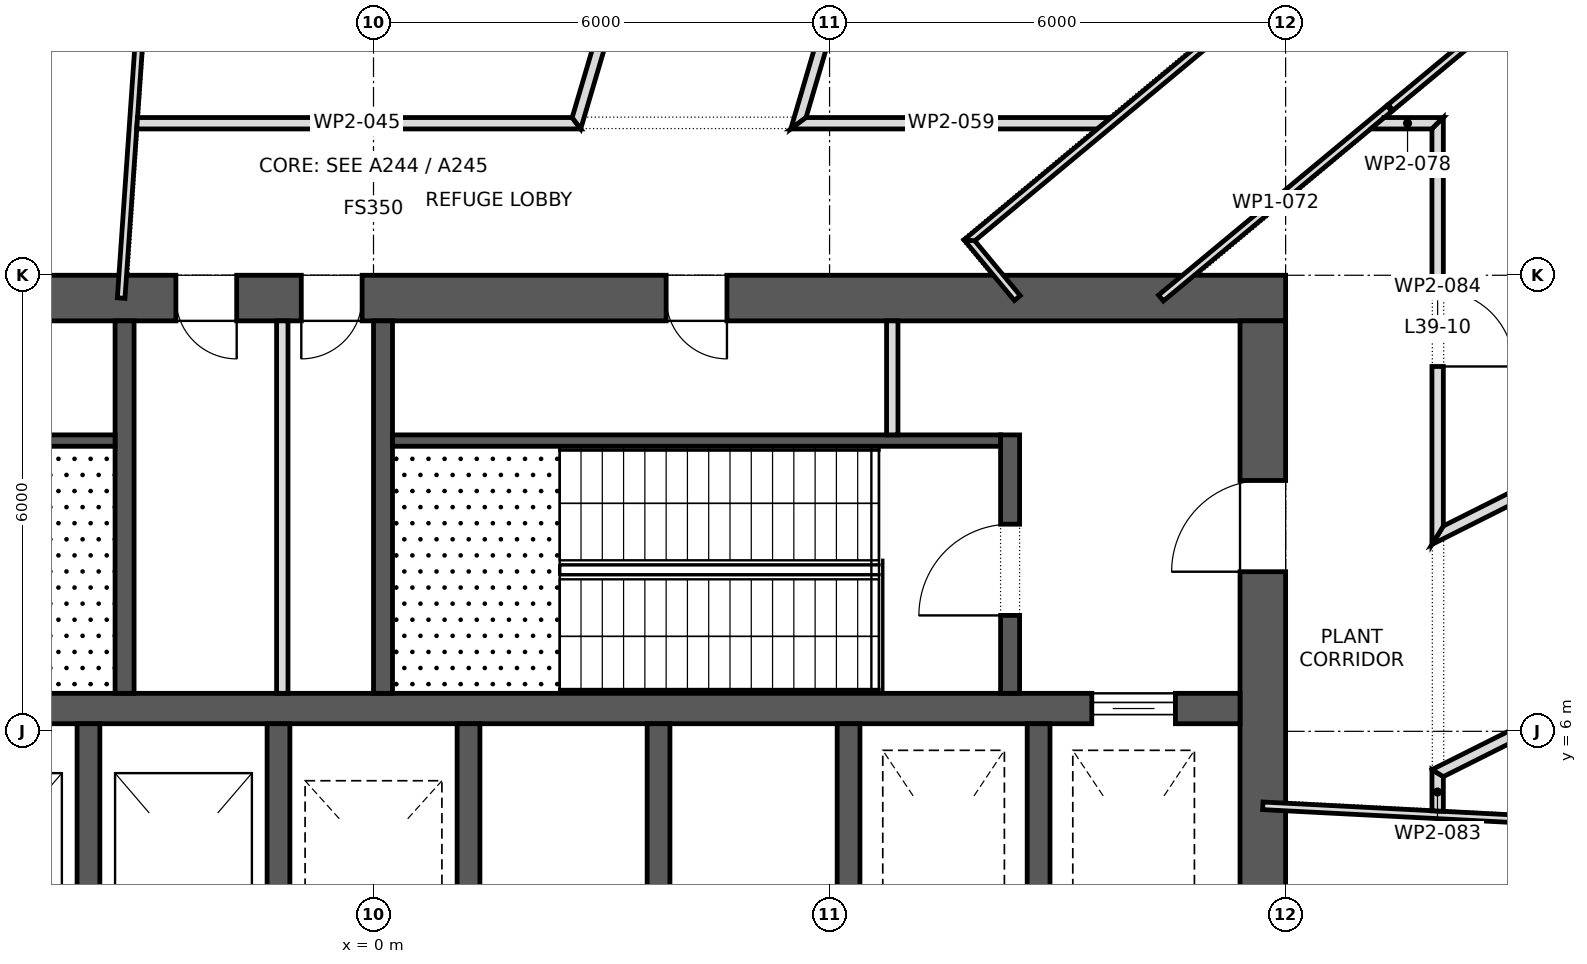
"""IFC4 building model, lengths in metres.
Left out: names, types, materials, properties, quantities, classifications, styles, units other than length and angle.
Written with IfcOpenShell. Run it as: python <this file> out.ifc"""

import sys

from ifc_helpers import new_model, si_unit, direction, frame, frame_2d, origin, place, context, subcontext, project, spatial, polyline, rectangle, outline, extrude, element, fill, save


model = new_model("IFC4")
c1 = context("Model", 3, precision=1e-05, world=origin(), true_north=direction((0.0, 1.0)))
c2 = subcontext(c1, "Body", "Model", "MODEL_VIEW")
j1 = project(units=[si_unit("LENGTHUNIT", "METRE"), si_unit("PLANEANGLEUNIT", "RADIAN")], contexts=[c1])
p1 = place(None, origin())
s1 = spatial("IfcSite", under=j1, at=p1, CompositionType="ELEMENT")
p2 = place(p1, origin())
s2 = spatial("IfcBuilding", under=s1, at=p2, CompositionType="ELEMENT")
p3 = place(p2, frame((0.0, 0.0, 173.5)))
s3 = spatial("IfcBuildingStorey", under=s2, at=p3, CompositionType="ELEMENT", Elevation=173.5)
p4 = place(p3, frame((-12.0, 11.7, 0.0), z_axis=(0.0, 0.0, 1.0), x_axis=(1.0, 0.0, 0.0)))
e1 = element("IfcWall", 1, at=p4, inside=s3, PredefinedType="SHEAR", context=c2, shape_type="SweptSolid", body=[
    extrude(rectangle(XDim=24.0, YDim=0.6, at=frame_2d((12.0, 0.0))), origin(), (0.0, 0.0, 1.0), 5.4),
])
p5 = place(p4, frame((9.4, 0.0, 0.0)))
e2 = element("IfcOpeningElement", 2, at=p5, cuts=e1, PredefinedType="OPENING", context=c2, shape_type="SweptSolid", body=[
    extrude(rectangle(XDim=0.8, YDim=2.1, at=frame_2d((0.4, 1.05))), frame((0.0, 0.312, 0.0), z_axis=(0.0, -1.0, 0.0), x_axis=(1.0, 0.0, 0.0)), (0.0, 0.0, 1.0), 0.624),
])
p6 = place(p4, frame((11.05, 0.0, 0.0)))
e3 = element("IfcOpeningElement", 3, at=p6, cuts=e1, PredefinedType="OPENING", context=c2, shape_type="SweptSolid", body=[
    extrude(rectangle(XDim=0.8, YDim=2.1, at=frame_2d((0.4, 1.05))), frame((0.0, 0.312, 0.0), z_axis=(0.0, -1.0, 0.0), x_axis=(1.0, 0.0, 0.0)), (0.0, 0.0, 1.0), 0.624),
])
p7 = place(p4, frame((4.2, 0.0, 0.0)))
e4 = element("IfcOpeningElement", 4, at=p7, cuts=e1, PredefinedType="OPENING", context=c2, shape_type="SweptSolid", body=[
    extrude(rectangle(XDim=0.8, YDim=2.1, at=frame_2d((0.4, 1.05))), frame((0.0, 0.312, 0.0), z_axis=(0.0, -1.0, 0.0), x_axis=(1.0, 0.0, 0.0)), (0.0, 0.0, 1.0), 0.624),
])
p8 = place(p4, frame((15.85, 0.0, 0.0)))
e5 = element("IfcOpeningElement", 5, at=p8, cuts=e1, PredefinedType="OPENING", context=c2, shape_type="SweptSolid", body=[
    extrude(rectangle(XDim=0.8, YDim=2.1, at=frame_2d((0.4, 1.05))), frame((0.0, 0.312, 0.0), z_axis=(0.0, -1.0, 0.0), x_axis=(1.0, 0.0, 0.0)), (0.0, 0.0, 1.0), 0.624),
])
p9 = place(p3, frame((11.7, -11.4, 0.0), z_axis=(0.0, 0.0, 1.0), x_axis=(0.0, 1.0, 0.0)))
e6 = element("IfcWall", 6, at=p9, inside=s3, PredefinedType="SHEAR", context=c2, shape_type="SweptSolid", body=[
    extrude(rectangle(XDim=22.8, YDim=0.6, at=frame_2d((11.4, 0.0))), origin(), (0.0, 0.0, 1.0), 5.4),
])
p10 = place(p9, frame((10.2, 0.0, 0.0)))
e7 = element("IfcOpeningElement", 7, at=p10, cuts=e6, PredefinedType="OPENING", context=c2, shape_type="SweptSolid", body=[
    extrude(rectangle(XDim=2.4, YDim=2.1, at=frame_2d((1.2, 1.05))), frame((0.0, 0.312, 0.0), z_axis=(0.0, -1.0, 0.0), x_axis=(1.0, 0.0, 0.0)), (0.0, 0.0, 1.0), 0.624),
])
p11 = place(p9, frame((19.5, 0.0, 0.0)))
e8 = element("IfcOpeningElement", 8, at=p11, cuts=e6, PredefinedType="OPENING", context=c2, shape_type="SweptSolid", body=[
    extrude(rectangle(XDim=1.2, YDim=2.1, at=frame_2d((0.6, 1.05))), frame((0.0, 0.312, 0.0), z_axis=(0.0, -1.0, 0.0), x_axis=(1.0, 0.0, 0.0)), (0.0, 0.0, 1.0), 0.624),
])
p12 = place(p9, frame((2.1, 0.0, 0.0)))
e9 = element("IfcOpeningElement", 9, at=p12, cuts=e6, PredefinedType="OPENING", context=c2, shape_type="SweptSolid", body=[
    extrude(rectangle(XDim=1.2, YDim=2.1, at=frame_2d((0.6, 1.05))), frame((0.0, 0.312, 0.0), z_axis=(0.0, -1.0, 0.0), x_axis=(1.0, 0.0, 0.0)), (0.0, 0.0, 1.0), 0.624),
])
p13 = place(p3, frame((-11.4, 6.3, 0.0), z_axis=(0.0, 0.0, 1.0), x_axis=(1.0, 0.0, 0.0)))
e10 = element("IfcWall", 10, at=p13, inside=s3, PredefinedType="SHEAR", context=c2, shape_type="SweptSolid", body=[
    extrude(rectangle(XDim=22.8, YDim=0.4, at=frame_2d((11.4, 0.0))), origin(), (0.0, 0.0, 1.0), 5.4),
])
p14 = place(p13, frame((20.85, 0.0, 0.0)))
e11 = element("IfcOpeningElement", 11, at=p14, cuts=e10, PredefinedType="OPENING", context=c2, shape_type="SweptSolid", body=[
    extrude(rectangle(XDim=1.1, YDim=2.1, at=frame_2d((0.55, 1.05))), frame((0.0, 0.212, 0.0), z_axis=(0.0, -1.0, 0.0), x_axis=(1.0, 0.0, 0.0)), (0.0, 0.0, 1.0), 0.424),
])
for number, where, z_axis, x_axis in (
    (12, (-3.75, 3.2, 0.0), (0.0, 0.0, 1.0), (0.0, 1.0, 0.0)),
    (13, (-1.25, 3.2, 0.0), (0.0, 0.0, 1.0), (0.0, 1.0, 0.0)),
    (14, (1.25, 3.2, 0.0), (0.0, 0.0, 1.0), (0.0, 1.0, 0.0)),
    (15, (3.75, 3.2, 0.0), (0.0, 0.0, 1.0), (0.0, 1.0, 0.0)),
    (16, (6.25, 3.2, 0.0), (0.0, 0.0, 1.0), (0.0, 1.0, 0.0)),
    (17, (8.75, 3.2, 0.0), (0.0, 0.0, 1.0), (0.0, 1.0, 0.0)),
):
    element("IfcWall", number, at=place(p3, frame(where, z_axis=z_axis, x_axis=x_axis)), inside=s3, PredefinedType="SHEAR", context=c2, shape_type="SweptSolid", body=[
        extrude(rectangle(XDim=2.9, YDim=0.3, at=frame_2d((1.45, 0.0))), origin(), (0.0, 0.0, 1.0), 5.4),
    ])
for number, where, z_axis, x_axis in (
    (18, (-3.275, 6.5, 0.0), (0.0, 0.0, 1.0), (0.0, 1.0, 0.0)),
    (19, (0.125, 6.5, 0.0), (0.0, 0.0, 1.0), (0.0, 1.0, 0.0)),
):
    element("IfcWall", number, at=place(p3, frame(where, z_axis=z_axis, x_axis=x_axis)), inside=s3, PredefinedType="SHEAR", context=c2, shape_type="SweptSolid", body=[
        extrude(rectangle(XDim=4.9, YDim=0.25, at=frame_2d((2.45, 0.0))), origin(), (0.0, 0.0, 1.0), 5.1),
    ])
p15 = place(p3, frame((8.375, 6.5, 0.0), z_axis=(0.0, 0.0, 1.0), x_axis=(0.0, 1.0, 0.0)))
e20 = element("IfcWall", 20, at=p15, inside=s3, PredefinedType="SHEAR", context=c2, shape_type="SweptSolid", body=[
    extrude(rectangle(XDim=3.4, YDim=0.25, at=frame_2d((1.7, 0.0))), origin(), (0.0, 0.0, 1.0), 5.1),
])
p16 = place(p15, frame((1.025, 0.0, 0.0)))
e21 = element("IfcOpeningElement", 21, at=p16, cuts=e20, PredefinedType="OPENING", context=c2, shape_type="SweptSolid", body=[
    extrude(rectangle(XDim=1.2, YDim=2.1, at=frame_2d((0.6, 1.05))), frame((0.0, 0.137, 0.0), z_axis=(0.0, -1.0, 0.0), x_axis=(1.0, 0.0, 0.0)), (0.0, 0.0, 1.0), 0.274),
])
for number, where, z_axis, x_axis in (
    (22, (-11.4, 9.825, 0.0), (0.0, 0.0, 1.0), (1.0, 0.0, 0.0)),
    (23, (0.25, 9.825, 0.0), (0.0, 0.0, 1.0), (1.0, 0.0, 0.0)),
):
    element("IfcWall", number, at=place(p3, frame(where, z_axis=z_axis, x_axis=x_axis)), inside=s3, PredefinedType="SHEAR", context=c2, shape_type="SweptSolid", body=[
        extrude(rectangle(XDim=8.0, YDim=0.15, at=frame_2d((4.0, 0.0))), origin(), (0.0, 0.0, 1.0), 5.1),
    ])
p17 = place(p3, frame((-1.2, 6.5, 0.0), z_axis=(0.0, 0.0, 1.0), x_axis=(0.0, 1.0, 0.0)))
e24 = element("IfcWall", 24, at=p17, inside=s3, PredefinedType="PARTITIONING", context=c2, shape_type="SweptSolid", body=[
    extrude(rectangle(XDim=4.9, YDim=0.15, at=frame_2d((2.45, 0.0))), origin(), (0.0, 0.0, 1.0), 5.1),
])
p18 = place(p3, frame((6.825, 9.9, 0.0), z_axis=(0.0, 0.0, 1.0), x_axis=(0.0, 1.0, 0.0)))
e25 = element("IfcWall", 25, at=p18, inside=s3, PredefinedType="PARTITIONING", context=c2, shape_type="SweptSolid", body=[
    extrude(rectangle(XDim=1.5, YDim=0.15, at=frame_2d((0.75, 0.0))), origin(), (0.0, 0.0, 1.0), 5.1),
])
p19 = place(p3, frame((-3.32, 11.7, 0.0), z_axis=(0.0, 0.0, 1.0), x_axis=(0.069412279606, 0.99758805899, 0.0)))
e26 = element("IfcWall", 26, at=p19, inside=s3, PredefinedType="PARTITIONING", context=c2, shape_type="SweptSolid", body=[
    extrude(rectangle(XDim=9.722, YDim=0.1, at=frame_2d((4.861, 0.0))), origin(), (0.0, 0.0, 1.0), 5.1),
])
p20 = place(p3, frame((-3.115, 14.0, 0.0), z_axis=(0.0, 0.0, 1.0), x_axis=(1.0, 0.0, 0.0)))
e27 = element("IfcWall", 27, at=p20, inside=s3, PredefinedType="PARTITIONING", context=c2, shape_type="SweptSolid", body=[
    extrude(outline(polyline([(0.0, -0.075), (1.947, -0.075), (3.894, -0.075), (5.841, -0.075), (5.785, 0.0), (5.729, 0.075), (3.823, 0.075), (1.917, 0.075), (0.01, 0.075), (0.0, -0.073), (0.0, -0.075)])), origin(), (0.0, 0.0, 1.0), 5.1),
])
p21 = place(p3, frame((2.654, 13.946, 0.0), z_axis=(0.0, 0.0, 1.0), x_axis=(0.283144655169, 0.959077214957, 0.0)))
e28 = element("IfcWall", 28, at=p21, inside=s3, PredefinedType="PARTITIONING", context=c2, shape_type="SweptSolid", body=[
    extrude(outline(polyline([(0.0, -0.075), (1.766, -0.075), (3.531, -0.075), (5.297, -0.075), (7.063, -0.075), (8.829, -0.075), (10.594, -0.075), (12.36, -0.075), (12.192, 0.075), (10.466, 0.075), (8.74, 0.075), (7.015, 0.075), (5.289, 0.075), (3.563, 0.075), (1.838, 0.075), (0.112, 0.075), (0.0, -0.075)])), origin(), (0.0, 0.0, 1.0), 5.1),
])
p22 = place(p21, frame((5.666, 0.0, 0.0)))
e29 = element("IfcOpeningElement", 29, at=p22, cuts=e28, PredefinedType="OPENING", context=c2, shape_type="SweptSolid", body=[
    extrude(rectangle(XDim=1.0, YDim=2.1, at=frame_2d((0.5, 1.05))), frame((0.0, 0.087, 0.0), z_axis=(0.0, -1.0, 0.0), x_axis=(1.0, 0.0, 0.0)), (0.0, 0.0, 1.0), 0.174),
])
p23 = place(p3, frame((5.562, 13.904, 0.0), z_axis=(0.0, 0.0, 1.0), x_axis=(0.282485676995, 0.959271516461, 0.0)))
e30 = element("IfcWall", 30, at=p23, inside=s3, PredefinedType="PARTITIONING", context=c2, shape_type="SweptSolid", body=[
    extrude(outline(polyline([(7.367, 0.075), (5.525, 0.075), (3.684, 0.075), (1.842, 0.075), (0.0, 0.075), (0.201, -0.075), (1.992, -0.075), (3.784, -0.075), (5.575, -0.075), (7.367, -0.075), (7.367, 0.075)])), origin(), (0.0, 0.0, 1.0), 5.1),
])
p24 = place(p3, frame((5.49, 14.0, 0.0), z_axis=(0.0, 0.0, 1.0), x_axis=(1.0, 0.0, 0.0)))
e31 = element("IfcWall", 31, at=p24, inside=s3, PredefinedType="PARTITIONING", context=c2, shape_type="SweptSolid", body=[
    extrude(outline(polyline([(0.0, -0.075), (1.345, -0.075), (2.689, -0.075), (4.034, -0.075), (4.214, 0.074), (4.214, 0.075), (2.876, 0.075), (1.538, 0.075), (0.2, 0.075), (0.1, 0.0), (0.0, -0.075)])), origin(), (0.0, 0.0, 1.0), 5.1),
])
p25 = place(p3, frame((7.808, 12.498, 0.0), z_axis=(0.0, 0.0, 1.0), x_axis=(0.638237196626, -0.769839776085, 0.0)))
e32 = element("IfcWall", 32, at=p25, inside=s3, PredefinedType="PARTITIONING", context=c2, shape_type="SweptSolid", body=[
    extrude(outline(polyline([(1.037, 0.05), (0.1, 0.05), (0.0, -0.05), (0.0, -0.05), (1.037, -0.05), (1.037, 0.05)])), origin(), (0.0, 0.0, 1.0), 5.1),
])
p26 = place(p3, frame((7.802, 12.428, 0.0), z_axis=(0.0, 0.0, 1.0), x_axis=(0.768935518413, 0.639326339613, 0.0)))
e33 = element("IfcWall", 33, at=p26, inside=s3, PredefinedType="PARTITIONING", context=c2, shape_type="SweptSolid", body=[
    extrude(outline(polyline([(13.608, 0.05), (11.664, 0.05), (9.72, 0.05), (7.776, 0.05), (5.832, 0.05), (3.888, 0.05), (1.944, 0.05), (0.0, 0.05), (0.1, -0.05), (2.03, -0.05), (3.959, -0.05), (5.889, -0.05), (7.819, -0.05), (9.748, -0.05), (11.678, -0.05), (13.608, -0.05), (13.608, 0.05)])), origin(), (0.0, 0.0, 1.0), 5.1),
])
p27 = place(p3, frame((10.36, 11.7, 0.0), z_axis=(0.0, 0.0, 1.0), x_axis=(0.76943127867, 0.638729604296, 0.0)))
e34 = element("IfcWall", 34, at=p27, inside=s3, PredefinedType="PARTITIONING", context=c2, shape_type="SweptSolid", body=[
    extrude(outline(polyline([(0.0, -0.05), (1.886, -0.05), (3.773, -0.05), (3.775, -0.047), (3.779, -0.05), (3.915, -0.05), (3.915, 0.05), (1.958, 0.05), (0.0, 0.05), (0.0, -0.05)])), origin(), (0.0, 0.0, 1.0), 5.1),
])
p28 = place(p3, frame((11.7, 5.02, 0.0), z_axis=(0.0, 0.0, 1.0), x_axis=(0.998673908363, -0.051482276115, 0.0)))
e35 = element("IfcWall", 35, at=p28, inside=s3, PredefinedType="PARTITIONING", context=c2, shape_type="SweptSolid", body=[
    extrude(outline(polyline([(18.997, -0.05), (18.997, -0.049), (18.987, -0.014), (18.997, -0.011), (18.997, -0.011), (18.963, -0.021), (18.943, 0.05), (17.086, 0.05), (15.23, 0.05), (13.373, 0.05), (11.517, 0.05), (9.66, 0.05), (7.803, 0.05), (5.947, 0.05), (4.09, 0.05), (2.234, 0.05), (2.225, 0.05), (2.225, 0.05), (0.0, 0.05), (0.0, -0.05), (1.9, -0.05), (3.8, -0.05), (5.699, -0.05), (7.599, -0.05), (9.499, -0.05), (11.398, -0.05), (13.298, -0.05), (15.198, -0.05), (17.098, -0.05), (18.997, -0.05)])), origin(), (0.0, 0.0, 1.0), 5.1),
])
p29 = place(p3, frame((13.119, 14.0, 0.0), z_axis=(0.0, 0.0, 1.0), x_axis=(1.0, 0.0, 0.0)))
e36 = element("IfcWall", 36, at=p29, inside=s3, PredefinedType="PARTITIONING", context=c2, shape_type="SweptSolid", body=[
    extrude(outline(polyline([(0.0, -0.075), (0.806, -0.075), (0.956, 0.075), (0.18, 0.075), (0.0, -0.075), (0.0, -0.075)])), origin(), (0.0, 0.0, 1.0), 5.1),
])
p30 = place(p3, frame((13.891, 8.525, 0.0), z_axis=(0.0, 0.0, 1.0), x_axis=(0.893668362043, 0.448728045349, 0.0)))
e37 = element("IfcWall", 37, at=p30, inside=s3, PredefinedType="PARTITIONING", context=c2, shape_type="SweptSolid", body=[
    extrude(outline(polyline([(0.0, -0.075), (1.924, -0.075), (3.849, -0.075), (5.773, -0.075), (7.698, -0.075), (9.622, -0.075), (11.547, -0.075), (13.471, -0.075), (13.288, 0.075), (11.425, 0.075), (9.561, 0.075), (7.698, 0.075), (5.834, 0.075), (3.97, 0.075), (2.107, 0.075), (0.243, 0.075), (0.0, -0.075)])), origin(), (0.0, 0.0, 1.0), 5.1),
])
p31 = place(p3, frame((14.0, 5.496, 0.0), z_axis=(0.0, 0.0, 1.0), x_axis=(0.0, -1.0, 0.0)))
e38 = element("IfcWall", 38, at=p31, inside=s3, PredefinedType="PARTITIONING", context=c2, shape_type="SweptSolid", body=[
    extrude(outline(polyline([(0.0, -0.075), (0.541, -0.075), (0.548, 0.068), (0.548, 0.075), (0.093, 0.075), (0.046, 0.0), (0.0, -0.075)])), origin(), (0.0, 0.0, 1.0), 5.1),
])
p32 = place(p3, frame((14.0, 14.075, 0.0), z_axis=(0.0, 0.0, 1.0), x_axis=(0.0, -1.0, 0.0)))
e39 = element("IfcWall", 39, at=p32, inside=s3, PredefinedType="PARTITIONING", context=c2, shape_type="SweptSolid", body=[
    extrude(outline(polyline([(0.15, -0.075), (1.972, -0.075), (3.794, -0.075), (5.616, -0.075), (5.374, 0.075), (3.582, 0.075), (1.791, 0.075), (0.0, 0.075), (0.15, -0.075)])), origin(), (0.0, 0.0, 1.0), 5.1),
])
p33 = place(p32, frame((2.275, 0.0, 0.0)))
e40 = element("IfcOpeningElement", 40, at=p33, cuts=e39, PredefinedType="OPENING", context=c2, shape_type="SweptSolid", body=[
    extrude(rectangle(XDim=1.0, YDim=2.1, at=frame_2d((0.5, 1.05))), frame((0.0, 0.087, 0.0), z_axis=(0.0, -1.0, 0.0), x_axis=(1.0, 0.0, 0.0)), (0.0, 0.0, 1.0), 0.174),
])
p34 = place(p3, frame((27.678, 12.304, 0.0), z_axis=(0.0, 0.0, 1.0), x_axis=(-0.894029102105, -0.448008888963, 0.0)))
e41 = element("IfcWall", 41, at=p34, inside=s3, PredefinedType="PARTITIONING", context=c2, shape_type="SweptSolid", body=[
    extrude(outline(polyline([(0.0, -0.075), (1.918, -0.075), (3.836, -0.075), (5.755, -0.075), (7.673, -0.075), (9.591, -0.075), (11.509, -0.075), (13.427, -0.075), (15.345, -0.075), (15.253, 0.075), (13.365, 0.075), (11.478, 0.075), (9.59, 0.075), (7.702, 0.075), (5.815, 0.075), (3.927, 0.075), (2.04, 0.075), (0.152, 0.075), (0.0, -0.075), (0.0, -0.075)])), origin(), (0.0, 0.0, 1.0), 5.1),
])
p35 = place(p34, frame((7.188, 0.0, 0.0)))
e42 = element("IfcOpeningElement", 42, at=p35, cuts=e41, PredefinedType="OPENING", context=c2, shape_type="SweptSolid", body=[
    extrude(rectangle(XDim=1.0, YDim=2.1, at=frame_2d((0.5, 1.05))), frame((0.0, 0.087, 0.0), z_axis=(0.0, -1.0, 0.0), x_axis=(1.0, 0.0, 0.0)), (0.0, 0.0, 1.0), 0.174),
])
p36 = place(p3, frame((13.373, 14.201, 0.0), z_axis=(0.0, 0.0, 1.0), x_axis=(0.769361268621, 0.638813930927, 0.0)))
e43 = element("IfcWall", 43, at=p36, inside=s3, PredefinedType="PARTITIONING", context=c2, shape_type="SweptSolid", body=[
    extrude(outline(polyline([(0.0, 0.05), (0.0, -0.05), (1.42, -0.05), (2.841, -0.05), (2.841, 0.05), (1.42, 0.05), (0.0, 0.05)])), origin(), (0.0, 0.0, 1.0), 4.5),
])
p37 = place(p14, origin())
e44 = element("IfcDoor", 44, at=p37, inside=s3, OperationType="SLIDING_TO_LEFT", PredefinedType="DOOR", context=c2, shape_type="SweptSolid", body=[
    extrude(rectangle(XDim=1.1, YDim=2.1, at=frame_2d((0.55, 1.05))), frame((0.0, 0.025, 0.0), z_axis=(0.0, -1.0, 0.0), x_axis=(1.0, 0.0, 0.0)), (0.0, 0.0, 1.0), 0.05),
])
fill(e11, e44)
p38 = place(p16, origin())
e45 = element("IfcDoor", 45, at=p38, inside=s3, OperationType="SINGLE_SWING_RIGHT", PredefinedType="DOOR", context=c2, shape_type="SweptSolid", body=[
    extrude(rectangle(XDim=1.2, YDim=2.1, at=frame_2d((0.6, 1.05))), frame((0.0, 0.025, 0.0), z_axis=(0.0, -1.0, 0.0), x_axis=(1.0, 0.0, 0.0)), (0.0, 0.0, 1.0), 0.05),
])
fill(e21, e45)
p39 = place(p11, origin())
e46 = element("IfcDoor", 46, at=p39, inside=s3, OperationType="SINGLE_SWING_RIGHT", PredefinedType="DOOR", context=c2, shape_type="SweptSolid", body=[
    extrude(rectangle(XDim=1.2, YDim=2.1, at=frame_2d((0.6, 1.05))), frame((0.0, 0.025, 0.0), z_axis=(0.0, -1.0, 0.0), x_axis=(1.0, 0.0, 0.0)), (0.0, 0.0, 1.0), 0.05),
])
fill(e8, e46)
p40 = place(p5, frame((0.8, 0.0, 0.0), z_axis=(0.0, 0.0, 1.0), x_axis=(-1.0, 0.0, 0.0)))
e47 = element("IfcDoor", 47, at=p40, inside=s3, OperationType="SINGLE_SWING_RIGHT", PredefinedType="DOOR", context=c2, shape_type="SweptSolid", body=[
    extrude(rectangle(XDim=0.8, YDim=2.1, at=frame_2d((0.4, 1.05))), frame((0.0, 0.025, 0.0), z_axis=(0.0, -1.0, 0.0), x_axis=(1.0, 0.0, 0.0)), (0.0, 0.0, 1.0), 0.05),
])
fill(e2, e47)
p41 = place(p6, frame((0.8, 0.0, 0.0), z_axis=(0.0, 0.0, 1.0), x_axis=(-1.0, 0.0, 0.0)))
e48 = element("IfcDoor", 48, at=p41, inside=s3, OperationType="SINGLE_SWING_LEFT", PredefinedType="DOOR", context=c2, shape_type="SweptSolid", body=[
    extrude(rectangle(XDim=0.8, YDim=2.1, at=frame_2d((0.4, 1.05))), frame((0.0, 0.025, 0.0), z_axis=(0.0, -1.0, 0.0), x_axis=(1.0, 0.0, 0.0)), (0.0, 0.0, 1.0), 0.05),
])
fill(e3, e48)
p42 = place(p8, frame((0.8, 0.0, 0.0), z_axis=(0.0, 0.0, 1.0), x_axis=(-1.0, 0.0, 0.0)))
e49 = element("IfcDoor", 49, at=p42, inside=s3, OperationType="SINGLE_SWING_RIGHT", PredefinedType="DOOR", context=c2, shape_type="SweptSolid", body=[
    extrude(rectangle(XDim=0.8, YDim=2.1, at=frame_2d((0.4, 1.05))), frame((0.0, 0.025, 0.0), z_axis=(0.0, -1.0, 0.0), x_axis=(1.0, 0.0, 0.0)), (0.0, 0.0, 1.0), 0.05),
])
fill(e5, e49)
p43 = place(p33, origin())
e50 = element("IfcDoor", 50, at=p43, inside=s3, OperationType="SINGLE_SWING_LEFT", PredefinedType="DOOR", context=c2, shape_type="SweptSolid", body=[
    extrude(rectangle(XDim=1.0, YDim=2.1, at=frame_2d((0.5, 1.05))), frame((0.0, 0.025, 0.0), z_axis=(0.0, -1.0, 0.0), x_axis=(1.0, 0.0, 0.0)), (0.0, 0.0, 1.0), 0.05),
])
fill(e40, e50)
save(model, sys.argv[1])
